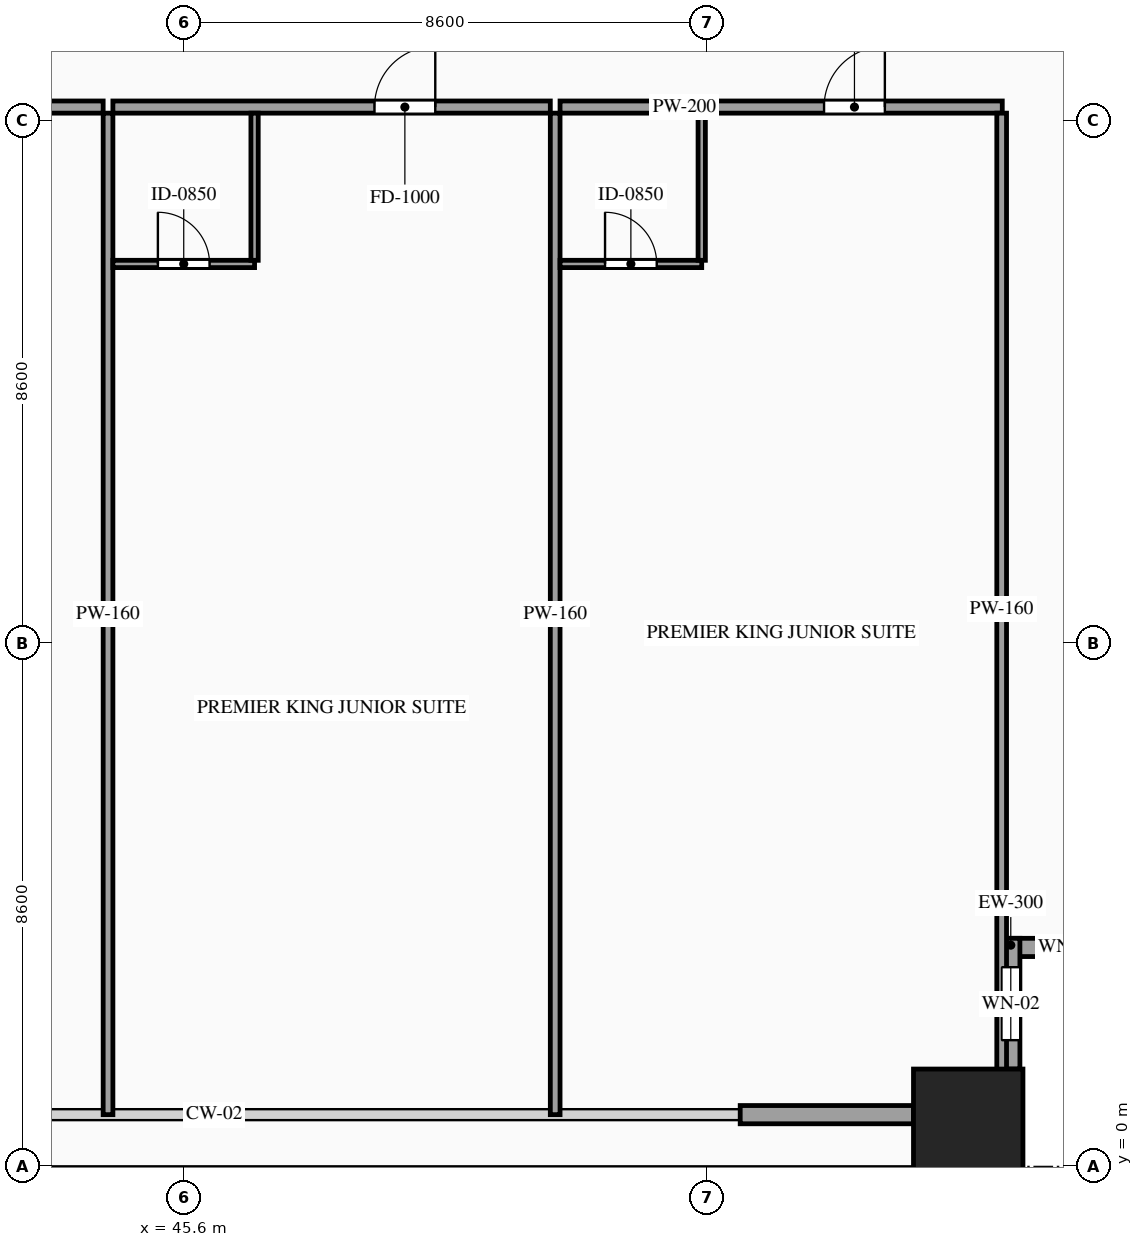
"""IFC4 building model, lengths in metres.
Left out: names, types, materials, properties, quantities, classifications, styles, units other than length and angle.
Written with IfcOpenShell. Run it as: python <this file> out.ifc"""

import sys

from ifc_helpers import new_model, si_unit, direction, frame, frame_2d, origin, origin_2d, place, context, subcontext, project, spatial, rectangle, hollow_rectangle, extrude, source, transform, mapped, element, fill, save


model = new_model("IFC4")
c1 = context("Model", 3, precision=1e-05, world=origin(), true_north=direction((0.0, 1.0)))
c2 = subcontext(c1, "Body", "Model", "MODEL_VIEW")
j1 = project(units=[si_unit("LENGTHUNIT", "METRE"), si_unit("PLANEANGLEUNIT", "RADIAN")], contexts=[c1])
p1 = place(None, origin())
s1 = spatial("IfcSite", under=j1, at=p1, CompositionType="ELEMENT")
p2 = place(p1, origin())
s2 = spatial("IfcBuilding", under=s1, at=p2, CompositionType="ELEMENT")
p3 = place(p2, frame((0.0, 0.0, 37.8)))
s3 = spatial("IfcBuildingStorey", under=s2, at=p3, CompositionType="ELEMENT", Elevation=37.8)
m1 = source(origin(), c2, "Body", "SweptSolid", [
    extrude(hollow_rectangle(XDim=1.8, YDim=1.8, WallThickness=0.08, at=origin_2d()), origin(), (0.0, 0.0, 1.0), 3.6),
])
p4 = place(p3, frame((58.5, 0.7, 0.0), z_axis=(0.0, 0.0, 1.0), x_axis=(1.0, 0.0, 0.0)))
e1 = element("IfcColumn", 1, at=p4, inside=s3, PredefinedType="COLUMN", context=c2, shape_type="MappedRepresentation", body=[
    mapped(m1, transform((0.0, 0.0, 0.0), scale=1.0)),
])
p5 = place(p3, frame((59.05, 3.6, 0.0), z_axis=(0.0, 0.0, 1.0), x_axis=(1.0, 0.0, 0.0)))
e2 = element("IfcWall", 2, at=p5, inside=s3, PredefinedType="SOLIDWALL", context=c2, shape_type="SweptSolid", body=[
    extrude(rectangle(XDim=2.15, YDim=0.3, at=frame_2d((1.075, 0.0))), origin(), (0.0, 0.0, 1.0), 3.32),
])
p6 = place(p5, frame((0.625, 0.0, 0.85)))
e3 = element("IfcOpeningElement", 3, at=p6, cuts=e2, PredefinedType="OPENING", context=c2, shape_type="SweptSolid", body=[
    extrude(rectangle(XDim=0.9, YDim=1.5, at=frame_2d((0.45, 0.75))), frame((0.0, 0.165, 0.0), z_axis=(0.0, -1.0, 0.0), x_axis=(1.0, 0.0, 0.0)), (0.0, 0.0, 1.0), 0.33),
])
p7 = place(p3, frame((59.2, 1.6, 0.0), z_axis=(0.0, 0.0, 1.0), x_axis=(0.0, 1.0, 0.0)))
e4 = element("IfcWall", 4, at=p7, inside=s3, PredefinedType="SOLIDWALL", context=c2, shape_type="SweptSolid", body=[
    extrude(rectangle(XDim=2.15, YDim=0.3, at=frame_2d((1.075, 0.0))), origin(), (0.0, 0.0, 1.0), 3.32),
])
p8 = place(p7, frame((0.475, 0.0, 0.85)))
e5 = element("IfcOpeningElement", 5, at=p8, cuts=e4, PredefinedType="OPENING", context=c2, shape_type="SweptSolid", body=[
    extrude(rectangle(XDim=1.2, YDim=2.1, at=frame_2d((0.6, 1.05))), frame((0.0, 0.165, 0.0), z_axis=(0.0, -1.0, 0.0), x_axis=(1.0, 0.0, 0.0)), (0.0, 0.0, 1.0), 0.33),
])
m2 = source(origin(), c2, "Body", "SweptSolid", [
    extrude(rectangle(XDim=2.85, YDim=0.3, at=frame_2d((1.425, 0.0))), origin(), (0.0, 0.0, 1.0), 2.715),
])
p9 = place(p3, frame((54.75, 0.85, 0.0), z_axis=(0.0, 0.0, 1.0), x_axis=(1.0, 0.0, 0.0)))
e6 = element("IfcWall", 6, at=p9, inside=s3, PredefinedType="SOLIDWALL", context=c2, shape_type="MappedRepresentation", body=[
    mapped(m2, transform((0.0, 0.0, 0.0), scale=1.0)),
])
p10 = place(p3, frame((37.08, 17.42, 0.0), z_axis=(0.0, 0.0, 1.0), x_axis=(1.0, 0.0, 0.0)))
e7 = element("IfcWall", 7, at=p10, inside=s3, PredefinedType="PARTITIONING", context=c2, shape_type="SweptSolid", body=[
    extrude(rectangle(XDim=7.193, YDim=0.2, at=frame_2d((3.596, 0.0))), origin(), (0.0, 0.0, 1.0), 3.32),
])
p11 = place(p10, frame((4.302, 0.0, 0.0)))
e8 = element("IfcOpeningElement", 8, at=p11, cuts=e7, PredefinedType="OPENING", context=c2, shape_type="SweptSolid", body=[
    extrude(rectangle(XDim=1.0, YDim=2.2, at=frame_2d((0.5, 1.1))), frame((0.0, 0.115, 0.0), z_axis=(0.0, -1.0, 0.0), x_axis=(1.0, 0.0, 0.0)), (0.0, 0.0, 1.0), 0.23),
])
m3 = source(origin(), c2, "Body", "SweptSolid", [
    extrude(rectangle(XDim=16.47, YDim=0.16, at=frame_2d((8.235, 0.0))), origin(), (0.0, 0.0, 1.0), 3.32),
])
p12 = place(p3, frame((44.353, 0.85, 0.0), z_axis=(0.0, 0.0, 1.0), x_axis=(0.0, 1.0, 0.0)))
e9 = element("IfcWall", 9, at=p12, inside=s3, PredefinedType="PARTITIONING", context=c2, shape_type="MappedRepresentation", body=[
    mapped(m3, transform((0.0, 0.0, 0.0), scale=1.0)),
])
p13 = place(p3, frame((44.433, 17.42, 0.0), z_axis=(0.0, 0.0, 1.0), x_axis=(1.0, 0.0, 0.0)))
e10 = element("IfcWall", 10, at=p13, inside=s3, PredefinedType="PARTITIONING", context=c2, shape_type="SweptSolid", body=[
    extrude(rectangle(XDim=7.194, YDim=0.2, at=frame_2d((3.597, 0.0))), origin(), (0.0, 0.0, 1.0), 3.32),
])
p14 = place(p13, frame((4.302, 0.0, 0.0)))
e11 = element("IfcOpeningElement", 11, at=p14, cuts=e10, PredefinedType="OPENING", context=c2, shape_type="SweptSolid", body=[
    extrude(rectangle(XDim=1.0, YDim=2.2, at=frame_2d((0.5, 1.1))), frame((0.0, 0.115, 0.0), z_axis=(0.0, -1.0, 0.0), x_axis=(1.0, 0.0, 0.0)), (0.0, 0.0, 1.0), 0.23),
])
p15 = place(p3, frame((51.707, 0.85, 0.0), z_axis=(0.0, 0.0, 1.0), x_axis=(0.0, 1.0, 0.0)))
e12 = element("IfcWall", 12, at=p15, inside=s3, PredefinedType="PARTITIONING", context=c2, shape_type="MappedRepresentation", body=[
    mapped(m3, transform((0.0, 0.0, 0.0), scale=1.0)),
])
p16 = place(p3, frame((44.433, 14.84, 0.0), z_axis=(0.0, 0.0, 1.0), x_axis=(1.0, 0.0, 0.0)))
e13 = element("IfcWall", 13, at=p16, inside=s3, PredefinedType="PARTITIONING", context=c2, shape_type="SweptSolid", body=[
    extrude(rectangle(XDim=2.33, YDim=0.12, at=frame_2d((1.165, 0.0))), origin(), (0.0, 0.0, 1.0), 3.32),
])
p17 = place(p16, frame((0.74, 0.0, 0.0)))
e14 = element("IfcOpeningElement", 14, at=p17, cuts=e13, PredefinedType="OPENING", context=c2, shape_type="SweptSolid", body=[
    extrude(rectangle(XDim=0.85, YDim=2.1, at=frame_2d((0.425, 1.05))), frame((0.0, 0.075, 0.0), z_axis=(0.0, -1.0, 0.0), x_axis=(1.0, 0.0, 0.0)), (0.0, 0.0, 1.0), 0.15),
])
m4 = source(origin(), c2, "Body", "SweptSolid", [
    extrude(rectangle(XDim=2.42, YDim=0.12, at=frame_2d((1.21, 0.0))), origin(), (0.0, 0.0, 1.0), 3.32),
])
p18 = place(p3, frame((46.763, 14.9, 0.0), z_axis=(0.0, 0.0, 1.0), x_axis=(0.0, 1.0, 0.0)))
e15 = element("IfcWall", 15, at=p18, inside=s3, PredefinedType="PARTITIONING", context=c2, shape_type="MappedRepresentation", body=[
    mapped(m4, transform((0.0, 0.0, 0.0), scale=1.0)),
])
p19 = place(p3, frame((51.787, 17.42, 0.0), z_axis=(0.0, 0.0, 1.0), x_axis=(1.0, 0.0, 0.0)))
e16 = element("IfcWall", 16, at=p19, inside=s3, PredefinedType="PARTITIONING", context=c2, shape_type="SweptSolid", body=[
    extrude(rectangle(XDim=7.273, YDim=0.2, at=frame_2d((3.636, 0.0))), origin(), (0.0, 0.0, 1.0), 3.32),
])
p20 = place(p19, frame((4.342, 0.0, 0.0)))
e17 = element("IfcOpeningElement", 17, at=p20, cuts=e16, PredefinedType="OPENING", context=c2, shape_type="SweptSolid", body=[
    extrude(rectangle(XDim=1.0, YDim=2.2, at=frame_2d((0.5, 1.1))), frame((0.0, 0.115, 0.0), z_axis=(0.0, -1.0, 0.0), x_axis=(1.0, 0.0, 0.0)), (0.0, 0.0, 1.0), 0.23),
])
m5 = source(origin(), c2, "Body", "SweptSolid", [
    extrude(rectangle(XDim=16.32, YDim=0.16, at=frame_2d((8.16, 0.0))), origin(), (0.0, 0.0, 1.0), 3.32),
])
p21 = place(p3, frame((59.05, 1.0, 0.0), z_axis=(0.0, 0.0, 1.0), x_axis=(0.0, 1.0, 0.0)))
e18 = element("IfcWall", 18, at=p21, inside=s3, PredefinedType="PARTITIONING", context=c2, shape_type="MappedRepresentation", body=[
    mapped(m5, transform((0.0, 0.0, 0.0), scale=1.0)),
])
p22 = place(p3, frame((51.787, 14.84, 0.0), z_axis=(0.0, 0.0, 1.0), x_axis=(1.0, 0.0, 0.0)))
e19 = element("IfcWall", 19, at=p22, inside=s3, PredefinedType="PARTITIONING", context=c2, shape_type="SweptSolid", body=[
    extrude(rectangle(XDim=2.33, YDim=0.12, at=frame_2d((1.165, 0.0))), origin(), (0.0, 0.0, 1.0), 3.32),
])
p23 = place(p22, frame((0.74, 0.0, 0.0)))
e20 = element("IfcOpeningElement", 20, at=p23, cuts=e19, PredefinedType="OPENING", context=c2, shape_type="SweptSolid", body=[
    extrude(rectangle(XDim=0.85, YDim=2.1, at=frame_2d((0.425, 1.05))), frame((0.0, 0.075, 0.0), z_axis=(0.0, -1.0, 0.0), x_axis=(1.0, 0.0, 0.0)), (0.0, 0.0, 1.0), 0.15),
])
p24 = place(p3, frame((54.117, 14.9, 0.0), z_axis=(0.0, 0.0, 1.0), x_axis=(0.0, 1.0, 0.0)))
e21 = element("IfcWall", 21, at=p24, inside=s3, PredefinedType="PARTITIONING", context=c2, shape_type="MappedRepresentation", body=[
    mapped(m4, transform((0.0, 0.0, 0.0), scale=1.0)),
])
m6 = source(origin(), c2, "Body", "SweptSolid", [
    extrude(rectangle(XDim=0.9, YDim=1.5, at=frame_2d((0.45, 0.75))), frame((0.0, 0.03, 0.0), z_axis=(0.0, -1.0, 0.0), x_axis=(1.0, 0.0, 0.0)), (0.0, 0.0, 1.0), 0.06),
])
p25 = place(p6, origin())
e22 = element("IfcWindow", 22, at=p25, inside=s3, PartitioningType="SINGLE_PANEL", PredefinedType="WINDOW", context=c2, shape_type="MappedRepresentation", body=[
    mapped(m6, transform((0.0, 0.0, 0.0), scale=1.0)),
])
fill(e3, e22)
m7 = source(origin(), c2, "Body", "SweptSolid", [
    extrude(rectangle(XDim=1.2, YDim=2.1, at=frame_2d((0.6, 1.05))), frame((0.0, 0.03, 0.0), z_axis=(0.0, -1.0, 0.0), x_axis=(1.0, 0.0, 0.0)), (0.0, 0.0, 1.0), 0.06),
])
p26 = place(p8, origin())
e23 = element("IfcWindow", 23, at=p26, inside=s3, PartitioningType="SINGLE_PANEL", PredefinedType="WINDOW", context=c2, shape_type="MappedRepresentation", body=[
    mapped(m7, transform((0.0, 0.0, 0.0), scale=1.0)),
])
fill(e5, e23)
m8 = source(origin(), c2, "Body", "SweptSolid", [
    extrude(rectangle(XDim=1.0, YDim=2.2, at=frame_2d((0.5, 1.1))), frame((0.0, 0.025, 0.0), z_axis=(0.0, -1.0, 0.0), x_axis=(1.0, 0.0, 0.0)), (0.0, 0.0, 1.0), 0.05),
])
p27 = place(p14, origin())
e24 = element("IfcDoor", 24, at=p27, inside=s3, OperationType="SINGLE_SWING_RIGHT", PredefinedType="DOOR", context=c2, shape_type="MappedRepresentation", body=[
    mapped(m8, transform((0.0, 0.0, 0.0), scale=1.0)),
])
fill(e11, e24)
m9 = source(origin(), c2, "Body", "SweptSolid", [
    extrude(rectangle(XDim=0.85, YDim=2.1, at=frame_2d((0.425, 1.05))), frame((0.0, 0.025, 0.0), z_axis=(0.0, -1.0, 0.0), x_axis=(1.0, 0.0, 0.0)), (0.0, 0.0, 1.0), 0.05),
])
p28 = place(p17, origin())
e25 = element("IfcDoor", 25, at=p28, inside=s3, OperationType="SINGLE_SWING_LEFT", PredefinedType="DOOR", context=c2, shape_type="MappedRepresentation", body=[
    mapped(m9, transform((0.0, 0.0, 0.0), scale=1.0)),
])
fill(e14, e25)
p29 = place(p20, origin())
e26 = element("IfcDoor", 26, at=p29, inside=s3, OperationType="SINGLE_SWING_RIGHT", PredefinedType="DOOR", context=c2, shape_type="MappedRepresentation", body=[
    mapped(m8, transform((0.0, 0.0, 0.0), scale=1.0)),
])
fill(e17, e26)
p30 = place(p23, origin())
e27 = element("IfcDoor", 27, at=p30, inside=s3, OperationType="SINGLE_SWING_LEFT", PredefinedType="DOOR", context=c2, shape_type="MappedRepresentation", body=[
    mapped(m9, transform((0.0, 0.0, 0.0), scale=1.0)),
])
fill(e20, e27)
save(model, sys.argv[1])
